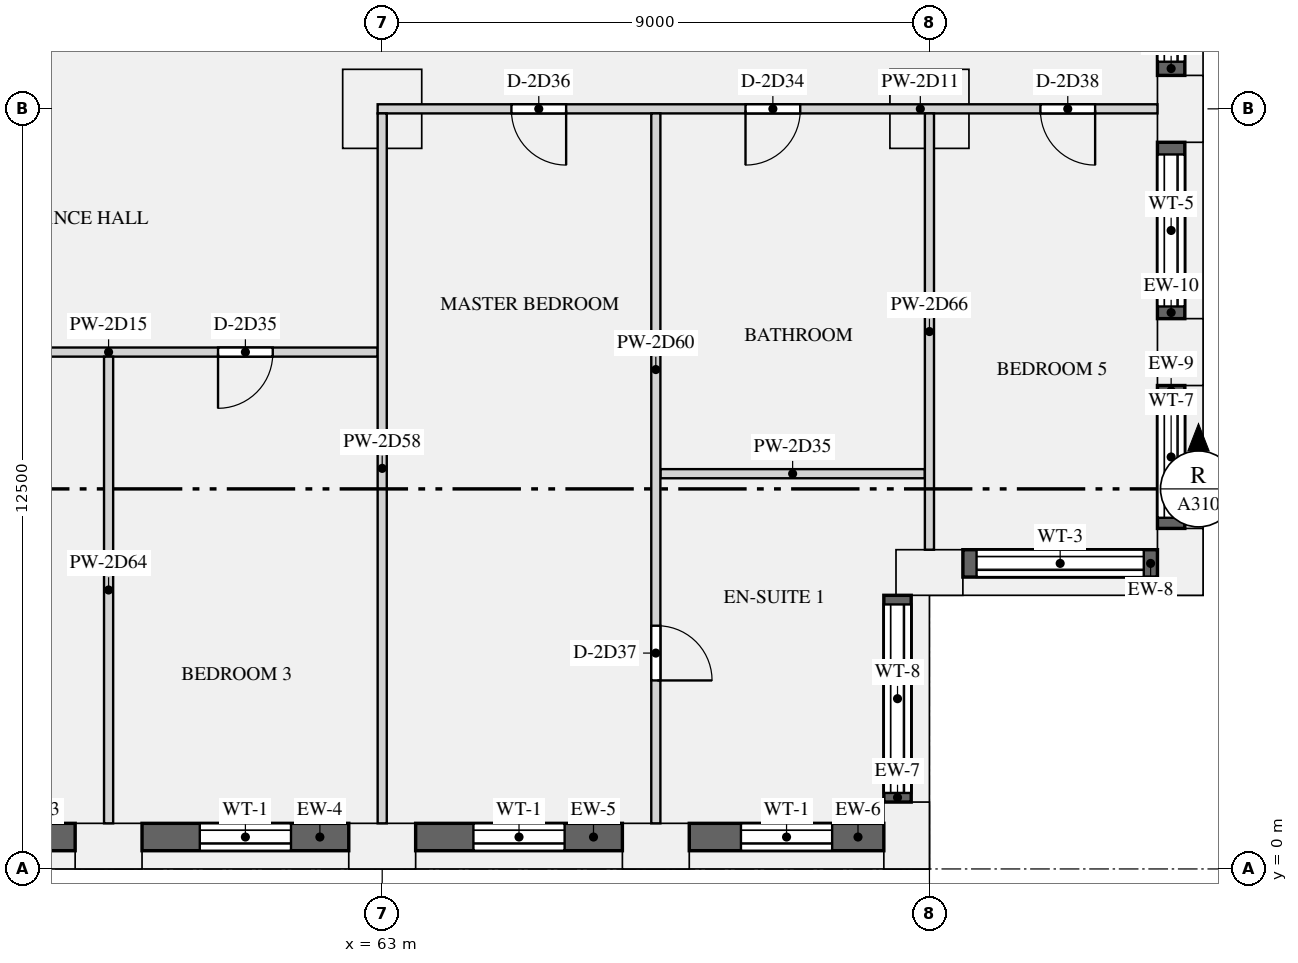
"""IFC4 building model, lengths in metres.
Left out: names, types, materials, properties, quantities, classifications, styles, units other than length and angle.
Written with IfcOpenShell. Run it as: python <this file> out.ifc"""

import sys

from ifc_helpers import new_model, si_unit, direction, frame, frame_2d, origin, origin_2d, place, context, subcontext, project, spatial, rectangle, extrude, element, fill, save


model = new_model("IFC4")
c1 = context("Model", 3, precision=1e-05, world=origin(), true_north=direction((0.0, 1.0)))
c2 = subcontext(c1, "Body", "Model", "MODEL_VIEW")
j1 = project(units=[si_unit("LENGTHUNIT", "METRE"), si_unit("PLANEANGLEUNIT", "RADIAN")], contexts=[c1])
p1 = place(None, origin())
s1 = spatial("IfcSite", under=j1, at=p1, CompositionType="ELEMENT")
p2 = place(p1, origin())
s2 = spatial("IfcBuilding", under=s1, at=p2, CompositionType="ELEMENT")
p3 = place(p2, frame((0.0, 0.0, 111.9)))
s3 = spatial("IfcBuildingStorey", under=s2, at=p3, CompositionType="ELEMENT", Elevation=111.9)
for number, where, z_axis, x_axis in (
    (1, (58.5, 0.375, 0.0), (0.0, 0.0, 1.0), (1.0, 0.0, 0.0)),
    (2, (63.0, 0.375, 0.0), (0.0, 0.0, 1.0), (1.0, 0.0, 0.0)),
    (3, (67.5, 0.375, 0.0), (0.0, 0.0, 1.0), (1.0, 0.0, 0.0)),
    (4, (71.625, 0.55, 0.0), (0.0, 0.0, 1.0), (0.0, 1.0, 0.0)),
    (5, (72.0, 4.875, 0.0), (0.0, 0.0, 1.0), (1.0, 0.0, 0.0)),
    (6, (76.125, 5.05, 0.0), (0.0, 0.0, 1.0), (0.0, 1.0, 0.0)),
    (7, (76.125, 8.5, 0.0), (0.0, 0.0, 1.0), (0.0, 1.0, 0.0)),
    (8, (76.125, 12.5, 0.0), (0.0, 0.0, 1.0), (0.0, 1.0, 0.0)),
):
    element("IfcColumn", number, at=place(p3, frame(where, z_axis=z_axis, x_axis=x_axis)), inside=s3, PredefinedType="USERDEFINED", context=c2, shape_type="SweptSolid", body=[
        extrude(rectangle(XDim=1.1, YDim=0.75, at=origin_2d()), origin(), (0.0, 0.0, 1.0), 3.15),
    ])
for number, where, z_axis, x_axis in (
    (9, (63.0, 12.5, 0.0), (0.0, 0.0, 1.0), (1.0, 0.0, 0.0)),
    (10, (72.0, 12.5, 0.0), (0.0, 0.0, 1.0), (1.0, 0.0, 0.0)),
):
    element("IfcColumn", number, at=place(p3, frame(where, z_axis=z_axis, x_axis=x_axis)), inside=s3, PredefinedType="COLUMN", context=c2, shape_type="SweptSolid", body=[
        extrude(rectangle(XDim=1.3, YDim=1.3, at=origin_2d()), origin(), (0.0, 0.0, 1.0), 3.15),
    ])
p4 = place(p3, frame((54.0, 0.525, 0.9), z_axis=(0.0, 0.0, 1.0), x_axis=(1.0, 0.0, 0.0)))
e11 = element("IfcWall", 11, at=p4, inside=s3, PredefinedType="SOLIDWALL", context=c2, shape_type="SweptSolid", body=[
    extrude(rectangle(XDim=3.95, YDim=0.45, at=frame_2d((1.975, 0.0))), origin(), (0.0, 0.0, 1.0), 1.93),
])
p5 = place(p4, frame((1.225, 0.0, 0.15)))
e12 = element("IfcOpeningElement", 12, at=p5, cuts=e11, PredefinedType="OPENING", context=c2, shape_type="SweptSolid", body=[
    extrude(rectangle(XDim=1.5, YDim=1.5, at=frame_2d((0.75, 0.75))), frame((0.0, 0.235, 0.0), z_axis=(0.0, -1.0, 0.0), x_axis=(1.0, 0.0, 0.0)), (0.0, 0.0, 1.0), 0.47),
])
p6 = place(p3, frame((59.05, 0.525, 0.9), z_axis=(0.0, 0.0, 1.0), x_axis=(1.0, 0.0, 0.0)))
e13 = element("IfcWall", 13, at=p6, inside=s3, PredefinedType="SOLIDWALL", context=c2, shape_type="SweptSolid", body=[
    extrude(rectangle(XDim=3.4, YDim=0.45, at=frame_2d((1.7, 0.0))), origin(), (0.0, 0.0, 1.0), 1.93),
])
p7 = place(p6, frame((0.95, 0.0, 0.15)))
e14 = element("IfcOpeningElement", 14, at=p7, cuts=e13, PredefinedType="OPENING", context=c2, shape_type="SweptSolid", body=[
    extrude(rectangle(XDim=1.5, YDim=1.5, at=frame_2d((0.75, 0.75))), frame((0.0, 0.235, 0.0), z_axis=(0.0, -1.0, 0.0), x_axis=(1.0, 0.0, 0.0)), (0.0, 0.0, 1.0), 0.47),
])
p8 = place(p3, frame((63.55, 0.525, 0.9), z_axis=(0.0, 0.0, 1.0), x_axis=(1.0, 0.0, 0.0)))
e15 = element("IfcWall", 15, at=p8, inside=s3, PredefinedType="SOLIDWALL", context=c2, shape_type="SweptSolid", body=[
    extrude(rectangle(XDim=3.4, YDim=0.45, at=frame_2d((1.7, 0.0))), origin(), (0.0, 0.0, 1.0), 1.93),
])
p9 = place(p8, frame((0.95, 0.0, 0.15)))
e16 = element("IfcOpeningElement", 16, at=p9, cuts=e15, PredefinedType="OPENING", context=c2, shape_type="SweptSolid", body=[
    extrude(rectangle(XDim=1.5, YDim=1.5, at=frame_2d((0.75, 0.75))), frame((0.0, 0.235, 0.0), z_axis=(0.0, -1.0, 0.0), x_axis=(1.0, 0.0, 0.0)), (0.0, 0.0, 1.0), 0.47),
])
p10 = place(p3, frame((68.05, 0.525, 0.9), z_axis=(0.0, 0.0, 1.0), x_axis=(1.0, 0.0, 0.0)))
e17 = element("IfcWall", 17, at=p10, inside=s3, PredefinedType="SOLIDWALL", context=c2, shape_type="SweptSolid", body=[
    extrude(rectangle(XDim=3.2, YDim=0.45, at=frame_2d((1.6, 0.0))), origin(), (0.0, 0.0, 1.0), 1.93),
])
p11 = place(p10, frame((0.85, 0.0, 0.15)))
e18 = element("IfcOpeningElement", 18, at=p11, cuts=e17, PredefinedType="OPENING", context=c2, shape_type="SweptSolid", body=[
    extrude(rectangle(XDim=1.5, YDim=1.5, at=frame_2d((0.75, 0.75))), frame((0.0, 0.235, 0.0), z_axis=(0.0, -1.0, 0.0), x_axis=(1.0, 0.0, 0.0)), (0.0, 0.0, 1.0), 0.47),
])
p12 = place(p3, frame((71.475, 1.1, 0.9), z_axis=(0.0, 0.0, 1.0), x_axis=(0.0, 1.0, 0.0)))
e19 = element("IfcWall", 19, at=p12, inside=s3, PredefinedType="SOLIDWALL", context=c2, shape_type="SweptSolid", body=[
    extrude(rectangle(XDim=3.4, YDim=0.45, at=frame_2d((1.7, 0.0))), origin(), (0.0, 0.0, 1.0), 1.93),
])
p13 = place(p12, frame((0.15, 0.0, 0.15)))
e20 = element("IfcOpeningElement", 20, at=p13, cuts=e19, PredefinedType="OPENING", context=c2, shape_type="SweptSolid", body=[
    extrude(rectangle(XDim=3.1, YDim=1.5, at=frame_2d((1.55, 0.75))), frame((0.0, 0.235, 0.0), z_axis=(0.0, -1.0, 0.0), x_axis=(1.0, 0.0, 0.0)), (0.0, 0.0, 1.0), 0.47),
])
p14 = place(p3, frame((72.55, 5.025, 0.9), z_axis=(0.0, 0.0, 1.0), x_axis=(1.0, 0.0, 0.0)))
e21 = element("IfcWall", 21, at=p14, inside=s3, PredefinedType="SOLIDWALL", context=c2, shape_type="SweptSolid", body=[
    extrude(rectangle(XDim=3.2, YDim=0.45, at=frame_2d((1.6, 0.0))), origin(), (0.0, 0.0, 1.0), 1.93),
])
p15 = place(p14, frame((0.225, 0.0, 0.15)))
e22 = element("IfcOpeningElement", 22, at=p15, cuts=e21, PredefinedType="OPENING", context=c2, shape_type="SweptSolid", body=[
    extrude(rectangle(XDim=2.75, YDim=1.5, at=frame_2d((1.375, 0.75))), frame((0.0, 0.235, 0.0), z_axis=(0.0, -1.0, 0.0), x_axis=(1.0, 0.0, 0.0)), (0.0, 0.0, 1.0), 0.47),
])
p16 = place(p3, frame((75.975, 5.6, 0.9), z_axis=(0.0, 0.0, 1.0), x_axis=(0.0, 1.0, 0.0)))
e23 = element("IfcWall", 23, at=p16, inside=s3, PredefinedType="SOLIDWALL", context=c2, shape_type="SweptSolid", body=[
    extrude(rectangle(XDim=2.35, YDim=0.45, at=frame_2d((1.175, 0.0))), origin(), (0.0, 0.0, 1.0), 1.93),
])
p17 = place(p16, frame((0.175, 0.0, 0.15)))
e24 = element("IfcOpeningElement", 24, at=p17, cuts=e23, PredefinedType="OPENING", context=c2, shape_type="SweptSolid", body=[
    extrude(rectangle(XDim=2.0, YDim=1.5, at=frame_2d((1.0, 0.75))), frame((0.0, 0.235, 0.0), z_axis=(0.0, -1.0, 0.0), x_axis=(1.0, 0.0, 0.0)), (0.0, 0.0, 1.0), 0.47),
])
p18 = place(p3, frame((75.975, 9.05, 0.9), z_axis=(0.0, 0.0, 1.0), x_axis=(0.0, 1.0, 0.0)))
e25 = element("IfcWall", 25, at=p18, inside=s3, PredefinedType="SOLIDWALL", context=c2, shape_type="SweptSolid", body=[
    extrude(rectangle(XDim=2.9, YDim=0.45, at=frame_2d((1.45, 0.0))), origin(), (0.0, 0.0, 1.0), 1.93),
])
p19 = place(p18, frame((0.2, 0.0, 0.15)))
e26 = element("IfcOpeningElement", 26, at=p19, cuts=e25, PredefinedType="OPENING", context=c2, shape_type="SweptSolid", body=[
    extrude(rectangle(XDim=2.5, YDim=1.5, at=frame_2d((1.25, 0.75))), frame((0.0, 0.235, 0.0), z_axis=(0.0, -1.0, 0.0), x_axis=(1.0, 0.0, 0.0)), (0.0, 0.0, 1.0), 0.47),
])
p20 = place(p3, frame((75.975, 13.05, 0.9), z_axis=(0.0, 0.0, 1.0), x_axis=(0.0, 1.0, 0.0)))
e27 = element("IfcWall", 27, at=p20, inside=s3, PredefinedType="SOLIDWALL", context=c2, shape_type="SweptSolid", body=[
    extrude(rectangle(XDim=2.7, YDim=0.45, at=frame_2d((1.35, 0.0))), origin(), (0.0, 0.0, 1.0), 1.93),
])
p21 = place(p20, frame((0.225, 0.0, 0.15)))
e28 = element("IfcOpeningElement", 28, at=p21, cuts=e27, PredefinedType="OPENING", context=c2, shape_type="SweptSolid", body=[
    extrude(rectangle(XDim=2.25, YDim=1.5, at=frame_2d((1.125, 0.75))), frame((0.0, 0.235, 0.0), z_axis=(0.0, -1.0, 0.0), x_axis=(1.0, 0.0, 0.0)), (0.0, 0.0, 1.0), 0.47),
])
p22 = place(p3, frame((62.925, 12.5, 0.0), z_axis=(0.0, 0.0, 1.0), x_axis=(1.0, 0.0, 0.0)))
e29 = element("IfcWall", 29, at=p22, inside=s3, PredefinedType="PARTITIONING", context=c2, shape_type="SweptSolid", body=[
    extrude(rectangle(XDim=12.825, YDim=0.15, at=frame_2d((6.413, 0.0))), origin(), (0.0, 0.0, 1.0), 2.83),
])
p23 = place(p22, frame((6.05, 0.0, 0.0)))
e30 = element("IfcOpeningElement", 30, at=p23, cuts=e29, PredefinedType="OPENING", context=c2, shape_type="SweptSolid", body=[
    extrude(rectangle(XDim=0.9, YDim=2.1, at=frame_2d((0.45, 1.05))), frame((0.0, 0.085, 0.0), z_axis=(0.0, -1.0, 0.0), x_axis=(1.0, 0.0, 0.0)), (0.0, 0.0, 1.0), 0.17),
])
p24 = place(p22, frame((2.2, 0.0, 0.0)))
e31 = element("IfcOpeningElement", 31, at=p24, cuts=e29, PredefinedType="OPENING", context=c2, shape_type="SweptSolid", body=[
    extrude(rectangle(XDim=0.9, YDim=2.1, at=frame_2d((0.45, 1.05))), frame((0.0, 0.085, 0.0), z_axis=(0.0, -1.0, 0.0), x_axis=(1.0, 0.0, 0.0)), (0.0, 0.0, 1.0), 0.17),
])
p25 = place(p22, frame((10.9, 0.0, 0.0)))
e32 = element("IfcOpeningElement", 32, at=p25, cuts=e29, PredefinedType="OPENING", context=c2, shape_type="SweptSolid", body=[
    extrude(rectangle(XDim=0.9, YDim=2.1, at=frame_2d((0.45, 1.05))), frame((0.0, 0.085, 0.0), z_axis=(0.0, -1.0, 0.0), x_axis=(1.0, 0.0, 0.0)), (0.0, 0.0, 1.0), 0.17),
])
p26 = place(p3, frame((54.0, 8.5, 0.0), z_axis=(0.0, 0.0, 1.0), x_axis=(1.0, 0.0, 0.0)))
e33 = element("IfcWall", 33, at=p26, inside=s3, PredefinedType="PARTITIONING", context=c2, shape_type="SweptSolid", body=[
    extrude(rectangle(XDim=8.925, YDim=0.15, at=frame_2d((4.462, 0.0))), origin(), (0.0, 0.0, 1.0), 2.83),
])
p27 = place(p26, frame((1.8, 0.0, 0.0)))
e34 = element("IfcOpeningElement", 34, at=p27, cuts=e33, PredefinedType="OPENING", context=c2, shape_type="SweptSolid", body=[
    extrude(rectangle(XDim=0.9, YDim=2.1, at=frame_2d((0.45, 1.05))), frame((0.0, 0.085, 0.0), z_axis=(0.0, -1.0, 0.0), x_axis=(1.0, 0.0, 0.0)), (0.0, 0.0, 1.0), 0.17),
])
p28 = place(p26, frame((6.3, 0.0, 0.0)))
e35 = element("IfcOpeningElement", 35, at=p28, cuts=e33, PredefinedType="OPENING", context=c2, shape_type="SweptSolid", body=[
    extrude(rectangle(XDim=0.9, YDim=2.1, at=frame_2d((0.45, 1.05))), frame((0.0, 0.085, 0.0), z_axis=(0.0, -1.0, 0.0), x_axis=(1.0, 0.0, 0.0)), (0.0, 0.0, 1.0), 0.17),
])
p29 = place(p3, frame((67.575, 6.5, 0.0), z_axis=(0.0, 0.0, 1.0), x_axis=(1.0, 0.0, 0.0)))
e36 = element("IfcWall", 36, at=p29, inside=s3, PredefinedType="PARTITIONING", context=c2, shape_type="SweptSolid", body=[
    extrude(rectangle(XDim=4.35, YDim=0.15, at=frame_2d((2.175, 0.0))), origin(), (0.0, 0.0, 1.0), 2.83),
])
p30 = place(p3, frame((63.0, 0.75, 0.0), z_axis=(0.0, 0.0, 1.0), x_axis=(0.0, 1.0, 0.0)))
e37 = element("IfcWall", 37, at=p30, inside=s3, PredefinedType="PARTITIONING", context=c2, shape_type="SweptSolid", body=[
    extrude(rectangle(XDim=11.675, YDim=0.15, at=frame_2d((5.837, 0.0))), origin(), (0.0, 0.0, 1.0), 2.83),
])
p31 = place(p3, frame((67.5, 0.75, 0.0), z_axis=(0.0, 0.0, 1.0), x_axis=(0.0, 1.0, 0.0)))
e38 = element("IfcWall", 38, at=p31, inside=s3, PredefinedType="PARTITIONING", context=c2, shape_type="SweptSolid", body=[
    extrude(rectangle(XDim=11.675, YDim=0.15, at=frame_2d((5.837, 0.0))), origin(), (0.0, 0.0, 1.0), 2.83),
])
p32 = place(p31, frame((2.35, 0.0, 0.0)))
e39 = element("IfcOpeningElement", 39, at=p32, cuts=e38, PredefinedType="OPENING", context=c2, shape_type="SweptSolid", body=[
    extrude(rectangle(XDim=0.9, YDim=2.1, at=frame_2d((0.45, 1.05))), frame((0.0, 0.085, 0.0), z_axis=(0.0, -1.0, 0.0), x_axis=(1.0, 0.0, 0.0)), (0.0, 0.0, 1.0), 0.17),
])
p33 = place(p3, frame((58.5, 0.75, 0.0), z_axis=(0.0, 0.0, 1.0), x_axis=(0.0, 1.0, 0.0)))
e40 = element("IfcWall", 40, at=p33, inside=s3, PredefinedType="PARTITIONING", context=c2, shape_type="SweptSolid", body=[
    extrude(rectangle(XDim=7.675, YDim=0.15, at=frame_2d((3.837, 0.0))), origin(), (0.0, 0.0, 1.0), 2.83),
])
p34 = place(p3, frame((72.0, 5.25, 0.0), z_axis=(0.0, 0.0, 1.0), x_axis=(0.0, 1.0, 0.0)))
e41 = element("IfcWall", 41, at=p34, inside=s3, PredefinedType="PARTITIONING", context=c2, shape_type="SweptSolid", body=[
    extrude(rectangle(XDim=7.175, YDim=0.15, at=frame_2d((3.587, 0.0))), origin(), (0.0, 0.0, 1.0), 2.83),
])
p35 = place(p7, origin())
e42 = element("IfcWindow", 42, at=p35, inside=s3, PartitioningType="SINGLE_PANEL", PredefinedType="WINDOW", context=c2, shape_type="SweptSolid", body=[
    extrude(rectangle(XDim=1.5, YDim=1.5, at=frame_2d((0.75, 0.75))), frame((0.0, -0.065, 0.0), z_axis=(0.0, -1.0, 0.0), x_axis=(1.0, 0.0, 0.0)), (0.0, 0.0, 1.0), 0.06),
])
fill(e14, e42)
p36 = place(p9, origin())
e43 = element("IfcWindow", 43, at=p36, inside=s3, PartitioningType="SINGLE_PANEL", PredefinedType="WINDOW", context=c2, shape_type="SweptSolid", body=[
    extrude(rectangle(XDim=1.5, YDim=1.5, at=frame_2d((0.75, 0.75))), frame((0.0, -0.065, 0.0), z_axis=(0.0, -1.0, 0.0), x_axis=(1.0, 0.0, 0.0)), (0.0, 0.0, 1.0), 0.06),
])
fill(e16, e43)
p37 = place(p11, origin())
e44 = element("IfcWindow", 44, at=p37, inside=s3, PartitioningType="SINGLE_PANEL", PredefinedType="WINDOW", context=c2, shape_type="SweptSolid", body=[
    extrude(rectangle(XDim=1.5, YDim=1.5, at=frame_2d((0.75, 0.75))), frame((0.0, -0.065, 0.0), z_axis=(0.0, -1.0, 0.0), x_axis=(1.0, 0.0, 0.0)), (0.0, 0.0, 1.0), 0.06),
])
fill(e18, e44)
p38 = place(p13, origin())
e45 = element("IfcWindow", 45, at=p38, inside=s3, PartitioningType="SINGLE_PANEL", PredefinedType="WINDOW", context=c2, shape_type="SweptSolid", body=[
    extrude(rectangle(XDim=3.1, YDim=1.5, at=frame_2d((1.55, 0.75))), frame((0.0, -0.065, 0.0), z_axis=(0.0, -1.0, 0.0), x_axis=(1.0, 0.0, 0.0)), (0.0, 0.0, 1.0), 0.06),
])
fill(e20, e45)
p39 = place(p15, origin())
e46 = element("IfcWindow", 46, at=p39, inside=s3, PartitioningType="SINGLE_PANEL", PredefinedType="WINDOW", context=c2, shape_type="SweptSolid", body=[
    extrude(rectangle(XDim=2.75, YDim=1.5, at=frame_2d((1.375, 0.75))), frame((0.0, -0.065, 0.0), z_axis=(0.0, -1.0, 0.0), x_axis=(1.0, 0.0, 0.0)), (0.0, 0.0, 1.0), 0.06),
])
fill(e22, e46)
p40 = place(p17, origin())
e47 = element("IfcWindow", 47, at=p40, inside=s3, PartitioningType="SINGLE_PANEL", PredefinedType="WINDOW", context=c2, shape_type="SweptSolid", body=[
    extrude(rectangle(XDim=2.0, YDim=1.5, at=frame_2d((1.0, 0.75))), frame((0.0, -0.065, 0.0), z_axis=(0.0, -1.0, 0.0), x_axis=(1.0, 0.0, 0.0)), (0.0, 0.0, 1.0), 0.06),
])
fill(e24, e47)
p41 = place(p19, origin())
e48 = element("IfcWindow", 48, at=p41, inside=s3, PartitioningType="SINGLE_PANEL", PredefinedType="WINDOW", context=c2, shape_type="SweptSolid", body=[
    extrude(rectangle(XDim=2.5, YDim=1.5, at=frame_2d((1.25, 0.75))), frame((0.0, -0.065, 0.0), z_axis=(0.0, -1.0, 0.0), x_axis=(1.0, 0.0, 0.0)), (0.0, 0.0, 1.0), 0.06),
])
fill(e26, e48)
p42 = place(p21, origin())
e49 = element("IfcWindow", 49, at=p42, inside=s3, PartitioningType="SINGLE_PANEL", PredefinedType="WINDOW", context=c2, shape_type="SweptSolid", body=[
    extrude(rectangle(XDim=2.25, YDim=1.5, at=frame_2d((1.125, 0.75))), frame((0.0, -0.065, 0.0), z_axis=(0.0, -1.0, 0.0), x_axis=(1.0, 0.0, 0.0)), (0.0, 0.0, 1.0), 0.06),
])
fill(e28, e49)
p43 = place(p23, frame((0.9, 0.0, 0.0), z_axis=(0.0, 0.0, 1.0), x_axis=(-1.0, 0.0, 0.0)))
e50 = element("IfcDoor", 50, at=p43, inside=s3, OperationType="SINGLE_SWING_RIGHT", PredefinedType="DOOR", context=c2, shape_type="SweptSolid", body=[
    extrude(rectangle(XDim=0.9, YDim=2.1, at=frame_2d((0.45, 1.05))), frame((0.0, 0.025, 0.0), z_axis=(0.0, -1.0, 0.0), x_axis=(1.0, 0.0, 0.0)), (0.0, 0.0, 1.0), 0.05),
])
fill(e30, e50)
p44 = place(p28, frame((0.9, 0.0, 0.0), z_axis=(0.0, 0.0, 1.0), x_axis=(-1.0, 0.0, 0.0)))
e51 = element("IfcDoor", 51, at=p44, inside=s3, OperationType="SINGLE_SWING_RIGHT", PredefinedType="DOOR", context=c2, shape_type="SweptSolid", body=[
    extrude(rectangle(XDim=0.9, YDim=2.1, at=frame_2d((0.45, 1.05))), frame((0.0, 0.025, 0.0), z_axis=(0.0, -1.0, 0.0), x_axis=(1.0, 0.0, 0.0)), (0.0, 0.0, 1.0), 0.05),
])
fill(e35, e51)
p45 = place(p24, frame((0.9, 0.0, 0.0), z_axis=(0.0, 0.0, 1.0), x_axis=(-1.0, 0.0, 0.0)))
e52 = element("IfcDoor", 52, at=p45, inside=s3, OperationType="SINGLE_SWING_LEFT", PredefinedType="DOOR", context=c2, shape_type="SweptSolid", body=[
    extrude(rectangle(XDim=0.9, YDim=2.1, at=frame_2d((0.45, 1.05))), frame((0.0, 0.025, 0.0), z_axis=(0.0, -1.0, 0.0), x_axis=(1.0, 0.0, 0.0)), (0.0, 0.0, 1.0), 0.05),
])
fill(e31, e52)
p46 = place(p32, frame((0.9, 0.0, 0.0), z_axis=(0.0, 0.0, 1.0), x_axis=(-1.0, 0.0, 0.0)))
e53 = element("IfcDoor", 53, at=p46, inside=s3, OperationType="SINGLE_SWING_RIGHT", PredefinedType="DOOR", context=c2, shape_type="SweptSolid", body=[
    extrude(rectangle(XDim=0.9, YDim=2.1, at=frame_2d((0.45, 1.05))), frame((0.0, 0.025, 0.0), z_axis=(0.0, -1.0, 0.0), x_axis=(1.0, 0.0, 0.0)), (0.0, 0.0, 1.0), 0.05),
])
fill(e39, e53)
p47 = place(p25, frame((0.9, 0.0, 0.0), z_axis=(0.0, 0.0, 1.0), x_axis=(-1.0, 0.0, 0.0)))
e54 = element("IfcDoor", 54, at=p47, inside=s3, OperationType="SINGLE_SWING_LEFT", PredefinedType="DOOR", context=c2, shape_type="SweptSolid", body=[
    extrude(rectangle(XDim=0.9, YDim=2.1, at=frame_2d((0.45, 1.05))), frame((0.0, 0.025, 0.0), z_axis=(0.0, -1.0, 0.0), x_axis=(1.0, 0.0, 0.0)), (0.0, 0.0, 1.0), 0.05),
])
fill(e32, e54)
save(model, sys.argv[1])
